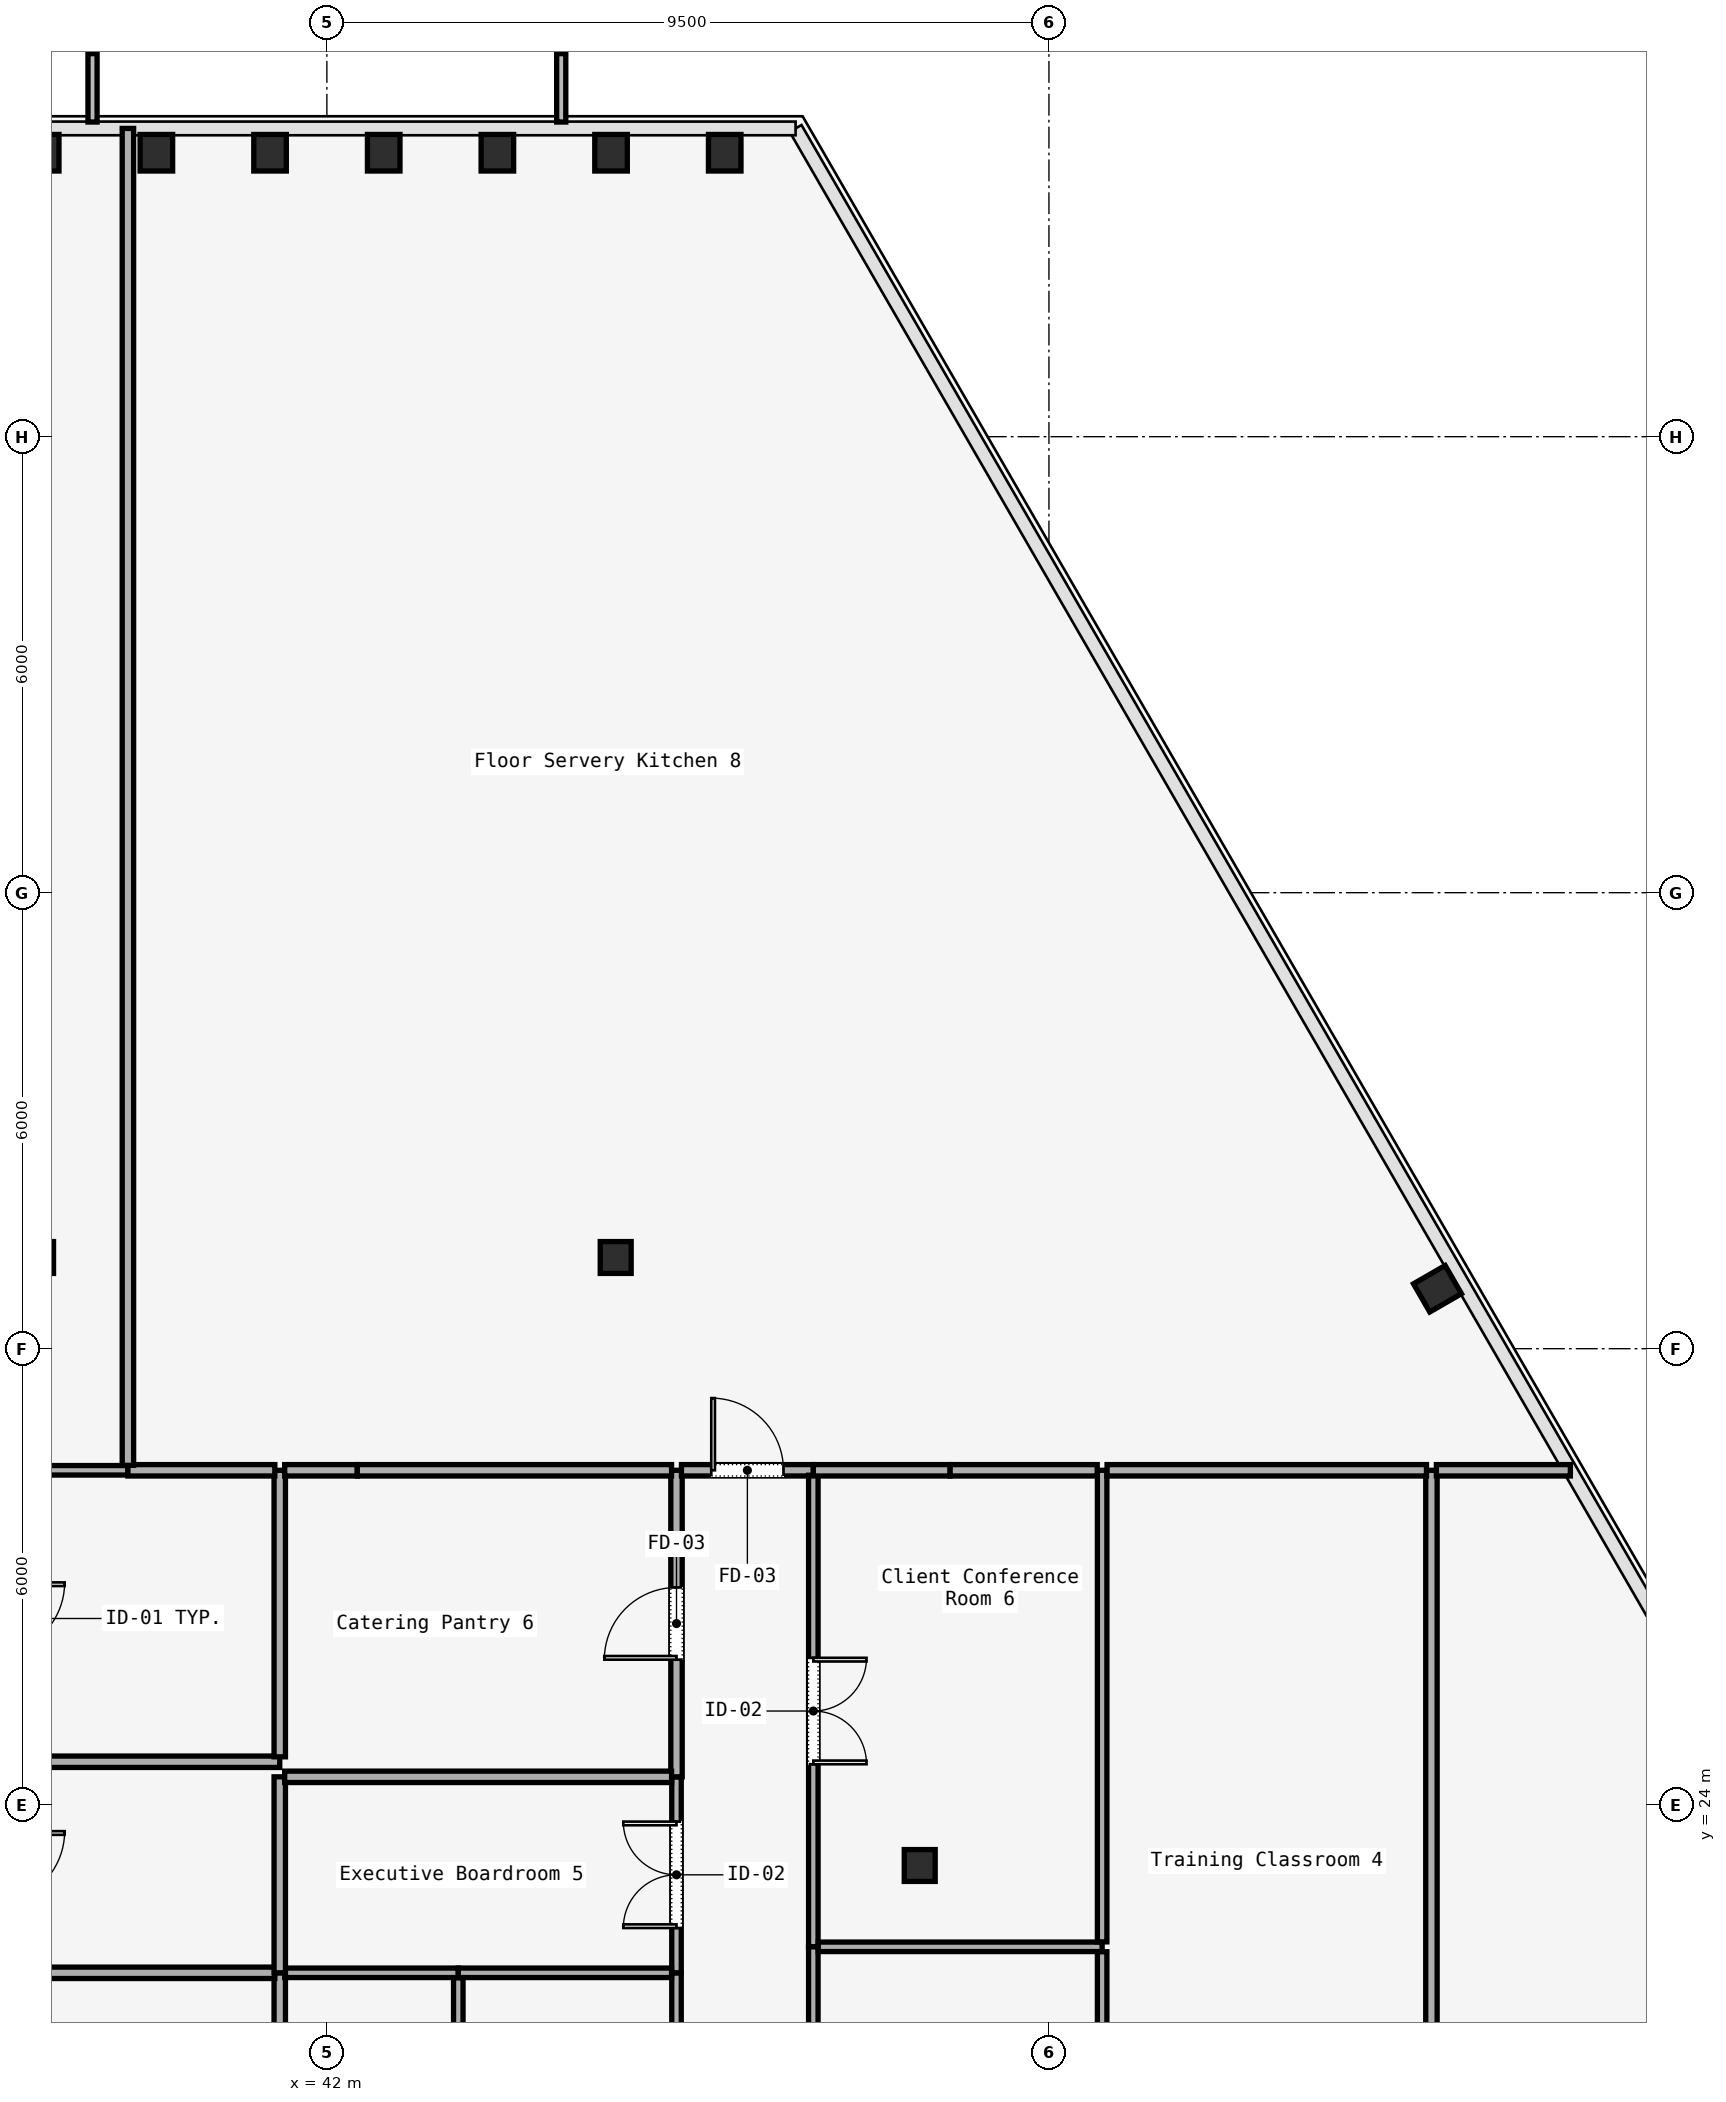
"""IFC4 building model, lengths in metres.
Left out: names, types, materials, properties, quantities, classifications, styles, units other than length and angle.
Written with IfcOpenShell. Run it as: python <this file> out.ifc"""

import sys

from ifc_helpers import new_model, si_unit, direction, frame, frame_2d, origin, origin_2d, place, context, subcontext, project, spatial, rectangle, i_section, extrude, element, fill, save


model = new_model("IFC4")
c1 = context("Model", 3, precision=1e-05, world=origin(), true_north=direction((0.0, 1.0)))
c2 = subcontext(c1, "Body", "Model", "MODEL_VIEW")
j1 = project(units=[si_unit("LENGTHUNIT", "METRE"), si_unit("PLANEANGLEUNIT", "RADIAN")], contexts=[c1])
p1 = place(None, origin())
s1 = spatial("IfcSite", under=j1, at=p1, CompositionType="ELEMENT")
p2 = place(p1, origin())
s2 = spatial("IfcBuilding", under=s1, at=p2, CompositionType="ELEMENT")
p3 = place(p2, frame((0.0, 0.0, 127.0)))
s3 = spatial("IfcBuildingStorey", under=s2, at=p3, CompositionType="ELEMENT", Elevation=127.0)
for number, where, z_axis, x_axis in (
    (1, (49.8, 23.2, 0.0), (0.0, 0.0, 1.0), (1.0, 0.0, 0.0)),
    (2, (38.2, 31.2, 0.0), (0.0, 0.0, 1.0), (1.0, 0.0, 0.0)),
    (3, (45.8, 31.2, 0.0), (0.0, 0.0, 1.0), (1.0, 0.0, 0.0)),
):
    element("IfcColumn", number, at=place(p3, frame(where, z_axis=z_axis, x_axis=x_axis)), inside=s3, PredefinedType="COLUMN", context=c2, shape_type="SweptSolid", body=[
        extrude(i_section(OverallWidth=0.407, OverallDepth=0.419, WebThickness=0.031, FlangeThickness=0.049, FilletRadius=0.015, at=origin_2d()), origin(), (0.0, 0.0, 1.0), 3.58),
    ])
for number, where, z_axis, x_axis in (
    (4, (56.612, 30.789, 0.0), (0.0, 0.0, 1.0), (-0.5, 0.866, 0.0)),
    (5, (47.234, 45.736, 0.0), (0.0, 0.0, 1.0), (1.0, 0.0, 0.0)),
    (6, (45.739, 45.736, 0.0), (0.0, 0.0, 1.0), (1.0, 0.0, 0.0)),
    (7, (44.243, 45.736, 0.0), (0.0, 0.0, 1.0), (1.0, 0.0, 0.0)),
    (8, (42.748, 45.736, 0.0), (0.0, 0.0, 1.0), (1.0, 0.0, 0.0)),
    (9, (41.252, 45.736, 0.0), (0.0, 0.0, 1.0), (1.0, 0.0, 0.0)),
    (10, (39.757, 45.736, 0.0), (0.0, 0.0, 1.0), (1.0, 0.0, 0.0)),
    (11, (38.261, 45.736, 0.0), (0.0, 0.0, 1.0), (1.0, 0.0, 0.0)),
):
    element("IfcColumn", number, at=place(p3, frame(where, z_axis=z_axis, x_axis=x_axis)), inside=s3, PredefinedType="COLUMN", context=c2, shape_type="SweptSolid", body=[
        extrude(i_section(OverallWidth=0.428, OverallDepth=0.481, WebThickness=0.051, FlangeThickness=0.065, FilletRadius=0.015, at=origin_2d()), origin(), (0.0, 0.0, 1.0), 3.58),
    ])
p4 = place(p3, frame((46.6, 17.065, 0.0), z_axis=(0.0, 0.0, 1.0), x_axis=(0.0, 1.0, 0.0)))
e12 = element("IfcWall", 12, at=p4, inside=s3, PredefinedType="PARTITIONING", context=c2, shape_type="SweptSolid", body=[
    extrude(rectangle(XDim=4.723, YDim=0.125, at=frame_2d((2.362, 0.0))), origin(), (0.0, 0.0, 1.0), 3.01),
])
p5 = place(p4, frame((1.662, 0.0, 0.0)))
e13 = element("IfcOpeningElement", 13, at=p5, cuts=e12, PredefinedType="OPENING", context=c2, shape_type="SweptSolid", body=[
    extrude(rectangle(XDim=1.4, YDim=2.2, at=frame_2d((0.7, 1.1))), frame((0.0, 0.062, 0.0), z_axis=(0.0, -1.0, 0.0), x_axis=(1.0, 0.0, 0.0)), (0.0, 0.0, 1.0), 0.125),
])
p6 = place(p3, frame((46.6, 21.788, 0.0), z_axis=(0.0, 0.0, 1.0), x_axis=(0.0, 1.0, 0.0)))
e14 = element("IfcWall", 14, at=p6, inside=s3, PredefinedType="PARTITIONING", context=c2, shape_type="SweptSolid", body=[
    extrude(rectangle(XDim=2.579, YDim=0.125, at=frame_2d((1.289, 0.0))), origin(), (0.0, 0.0, 1.0), 3.01),
])
p7 = place(p6, frame((0.589, 0.0, 0.0)))
e15 = element("IfcOpeningElement", 15, at=p7, cuts=e14, PredefinedType="OPENING", context=c2, shape_type="SweptSolid", body=[
    extrude(rectangle(XDim=1.4, YDim=2.2, at=frame_2d((0.7, 1.1))), frame((0.0, 0.062, 0.0), z_axis=(0.0, -1.0, 0.0), x_axis=(1.0, 0.0, 0.0)), (0.0, 0.0, 1.0), 0.125),
])
p8 = place(p3, frame((46.6, 24.367, 0.0), z_axis=(0.0, 0.0, 1.0), x_axis=(0.0, 1.0, 0.0)))
e16 = element("IfcWall", 16, at=p8, inside=s3, PredefinedType="PARTITIONING", context=c2, shape_type="SweptSolid", body=[
    extrude(rectangle(XDim=4.033, YDim=0.15, at=frame_2d((2.017, 0.0))), origin(), (0.0, 0.0, 1.0), 3.01),
])
p9 = place(p8, frame((1.542, 0.0, 0.0)))
e17 = element("IfcOpeningElement", 17, at=p9, cuts=e16, PredefinedType="OPENING", context=c2, shape_type="SweptSolid", body=[
    extrude(rectangle(XDim=0.95, YDim=2.2, at=frame_2d((0.475, 1.1))), frame((0.0, 0.075, 0.0), z_axis=(0.0, -1.0, 0.0), x_axis=(1.0, 0.0, 0.0)), (0.0, 0.0, 1.0), 0.15),
])
p10 = place(p3, frame((46.665, 28.4, 0.0), z_axis=(0.0, 0.0, 1.0), x_axis=(1.0, 0.0, 0.0)))
e18 = element("IfcWall", 18, at=p10, inside=s3, PredefinedType="PARTITIONING", context=c2, shape_type="SweptSolid", body=[
    extrude(rectangle(XDim=1.735, YDim=0.15, at=frame_2d((0.867, 0.0))), origin(), (0.0, 0.0, 1.0), 3.01),
])
p11 = place(p10, frame((0.393, 0.0, 0.0)))
e19 = element("IfcOpeningElement", 19, at=p11, cuts=e18, PredefinedType="OPENING", context=c2, shape_type="SweptSolid", body=[
    extrude(rectangle(XDim=0.95, YDim=2.2, at=frame_2d((0.475, 1.1))), frame((0.0, 0.075, 0.0), z_axis=(0.0, -1.0, 0.0), x_axis=(1.0, 0.0, 0.0)), (0.0, 0.0, 1.0), 0.15),
])
p12 = place(p3, frame((48.4, 28.335, 0.0), z_axis=(0.0, 0.0, 1.0), x_axis=(0.0, -1.0, 0.0)))
e20 = element("IfcWall", 20, at=p12, inside=s3, PredefinedType="PARTITIONING", context=c2, shape_type="SweptSolid", body=[
    extrude(rectangle(XDim=6.205, YDim=0.125, at=frame_2d((3.103, 0.0))), origin(), (0.0, 0.0, 1.0), 3.01),
])
p13 = place(p12, frame((2.403, 0.0, 0.0)))
e21 = element("IfcOpeningElement", 21, at=p13, cuts=e20, PredefinedType="OPENING", context=c2, shape_type="SweptSolid", body=[
    extrude(rectangle(XDim=1.4, YDim=2.2, at=frame_2d((0.7, 1.1))), frame((0.0, 0.062, 0.0), z_axis=(0.0, -1.0, 0.0), x_axis=(1.0, 0.0, 0.0)), (0.0, 0.0, 1.0), 0.125),
])
p14 = place(p3, frame((48.4, 22.13, 0.0), z_axis=(0.0, 0.0, 1.0), x_axis=(0.0, -1.0, 0.0)))
e22 = element("IfcWall", 22, at=p14, inside=s3, PredefinedType="PARTITIONING", context=c2, shape_type="SweptSolid", body=[
    extrude(rectangle(XDim=5.13, YDim=0.125, at=frame_2d((2.565, 0.0))), origin(), (0.0, 0.0, 1.0), 3.01),
])
p15 = place(p14, frame((2.09, 0.0, 0.0)))
e23 = element("IfcOpeningElement", 23, at=p15, cuts=e22, PredefinedType="OPENING", context=c2, shape_type="SweptSolid", body=[
    extrude(rectangle(XDim=0.95, YDim=2.2, at=frame_2d((0.475, 1.1))), frame((0.0, 0.062, 0.0), z_axis=(0.0, -1.0, 0.0), x_axis=(1.0, 0.0, 0.0)), (0.0, 0.0, 1.0), 0.125),
])
p16 = place(p3, frame((41.38, 21.788, 0.0), z_axis=(0.0, 0.0, 1.0), x_axis=(0.0, -1.0, 0.0)))
e24 = element("IfcWall", 24, at=p16, inside=s3, PredefinedType="PARTITIONING", context=c2, shape_type="SweptSolid", body=[
    extrude(rectangle(XDim=4.723, YDim=0.15, at=frame_2d((2.362, 0.0))), origin(), (0.0, 0.0, 1.0), 3.01),
])
p17 = place(p3, frame((37.665, 21.788, 0.0), z_axis=(0.0, 0.0, 1.0), x_axis=(1.0, 0.0, 0.0)))
e25 = element("IfcWall", 25, at=p17, inside=s3, PredefinedType="PARTITIONING", context=c2, shape_type="SweptSolid", body=[
    extrude(rectangle(XDim=3.65, YDim=0.15, at=frame_2d((1.825, 0.0))), origin(), (0.0, 0.0, 1.0), 3.01),
])
p18 = place(p3, frame((41.445, 21.788, 0.0), z_axis=(0.0, 0.0, 1.0), x_axis=(1.0, 0.0, 0.0)))
e26 = element("IfcWall", 26, at=p18, inside=s3, PredefinedType="PARTITIONING", context=c2, shape_type="SweptSolid", body=[
    extrude(rectangle(XDim=2.284, YDim=0.125, at=frame_2d((1.142, 0.0))), origin(), (0.0, 0.0, 1.0), 3.01),
])
p19 = place(p3, frame((43.729, 21.723, 0.0), z_axis=(0.0, 0.0, 1.0), x_axis=(0.0, -1.0, 0.0)))
e27 = element("IfcWall", 27, at=p19, inside=s3, PredefinedType="PARTITIONING", context=c2, shape_type="SweptSolid", body=[
    extrude(rectangle(XDim=4.658, YDim=0.125, at=frame_2d((2.329, 0.0))), origin(), (0.0, 0.0, 1.0), 3.01),
])
p20 = place(p3, frame((43.729, 21.788, 0.0), z_axis=(0.0, 0.0, 1.0), x_axis=(1.0, 0.0, 0.0)))
e28 = element("IfcWall", 28, at=p20, inside=s3, PredefinedType="PARTITIONING", context=c2, shape_type="SweptSolid", body=[
    extrude(rectangle(XDim=2.806, YDim=0.125, at=frame_2d((1.403, 0.0))), origin(), (0.0, 0.0, 1.0), 3.01),
])
p21 = place(p3, frame((48.465, 22.13, 0.0), z_axis=(0.0, 0.0, 1.0), x_axis=(1.0, 0.0, 0.0)))
e29 = element("IfcWall", 29, at=p21, inside=s3, PredefinedType="PARTITIONING", context=c2, shape_type="SweptSolid", body=[
    extrude(rectangle(XDim=3.735, YDim=0.125, at=frame_2d((1.867, 0.0))), origin(), (0.0, 0.0, 1.0), 3.01),
])
p22 = place(p3, frame((52.2, 22.065, 0.0), z_axis=(0.0, 0.0, 1.0), x_axis=(0.0, -1.0, 0.0)))
e30 = element("IfcWall", 30, at=p22, inside=s3, PredefinedType="PARTITIONING", context=c2, shape_type="SweptSolid", body=[
    extrude(rectangle(XDim=5.0, YDim=0.125, at=frame_2d((2.5, 0.0))), origin(), (0.0, 0.0, 1.0), 3.01),
])
p23 = place(p3, frame((56.532, 17.065, 0.0), z_axis=(0.0, 0.0, 1.0), x_axis=(0.0, 1.0, 0.0)))
e31 = element("IfcWall", 31, at=p23, inside=s3, PredefinedType="PARTITIONING", context=c2, shape_type="SweptSolid", body=[
    extrude(rectangle(XDim=11.335, YDim=0.15, at=frame_2d((5.667, 0.0))), origin(), (0.0, 0.0, 1.0), 3.01),
])
p24 = place(p3, frame((56.597, 28.4, 0.0), z_axis=(0.0, 0.0, 1.0), x_axis=(1.0, 0.0, 0.0)))
e32 = element("IfcWall", 32, at=p24, inside=s3, PredefinedType="PARTITIONING", context=c2, shape_type="SweptSolid", body=[
    extrude(rectangle(XDim=1.763, YDim=0.15, at=frame_2d((0.882, 0.0))), origin(), (0.0, 0.0, 1.0), 3.01),
])
p25 = place(p3, frame((52.2, 22.195, 0.0), z_axis=(0.0, 0.0, 1.0), x_axis=(0.0, 1.0, 0.0)))
e33 = element("IfcWall", 33, at=p25, inside=s3, PredefinedType="PARTITIONING", context=c2, shape_type="SweptSolid", body=[
    extrude(rectangle(XDim=6.205, YDim=0.125, at=frame_2d((3.103, 0.0))), origin(), (0.0, 0.0, 1.0), 3.01),
])
p26 = place(p3, frame((52.265, 28.4, 0.0), z_axis=(0.0, 0.0, 1.0), x_axis=(1.0, 0.0, 0.0)))
e34 = element("IfcWall", 34, at=p26, inside=s3, PredefinedType="PARTITIONING", context=c2, shape_type="SweptSolid", body=[
    extrude(rectangle(XDim=4.202, YDim=0.15, at=frame_2d((2.101, 0.0))), origin(), (0.0, 0.0, 1.0), 3.01),
])
p27 = place(p3, frame((41.38, 21.788, 0.0), z_axis=(0.0, 0.0, 1.0), x_axis=(0.0, 1.0, 0.0)))
e35 = element("IfcWall", 35, at=p27, inside=s3, PredefinedType="PARTITIONING", context=c2, shape_type="SweptSolid", body=[
    extrude(rectangle(XDim=2.579, YDim=0.15, at=frame_2d((1.289, 0.0))), origin(), (0.0, 0.0, 1.0), 3.01),
])
p28 = place(p3, frame((41.445, 24.367, 0.0), z_axis=(0.0, 0.0, 1.0), x_axis=(1.0, 0.0, 0.0)))
e36 = element("IfcWall", 36, at=p28, inside=s3, PredefinedType="PARTITIONING", context=c2, shape_type="SweptSolid", body=[
    extrude(rectangle(XDim=5.09, YDim=0.15, at=frame_2d((2.545, 0.0))), origin(), (0.0, 0.0, 1.0), 3.01),
])
p29 = place(p3, frame((37.665, 24.565, 0.0), z_axis=(0.0, 0.0, 1.0), x_axis=(1.0, 0.0, 0.0)))
e37 = element("IfcWall", 37, at=p29, inside=s3, PredefinedType="PARTITIONING", context=c2, shape_type="SweptSolid", body=[
    extrude(rectangle(XDim=3.715, YDim=0.15, at=frame_2d((1.857, 0.0))), origin(), (0.0, 0.0, 1.0), 3.01),
])
p30 = place(p3, frame((48.4, 28.4, 0.0), z_axis=(0.0, 0.0, 1.0), x_axis=(1.0, 0.0, 0.0)))
e38 = element("IfcWall", 38, at=p30, inside=s3, PredefinedType="PARTITIONING", context=c2, shape_type="SweptSolid", body=[
    extrude(rectangle(XDim=1.8, YDim=0.15, at=frame_2d((0.9, 0.0))), origin(), (0.0, 0.0, 1.0), 3.01),
])
p31 = place(p3, frame((50.2, 28.4, 0.0), z_axis=(0.0, 0.0, 1.0), x_axis=(1.0, 0.0, 0.0)))
e39 = element("IfcWall", 39, at=p31, inside=s3, PredefinedType="PARTITIONING", context=c2, shape_type="SweptSolid", body=[
    extrude(rectangle(XDim=1.935, YDim=0.15, at=frame_2d((0.968, 0.0))), origin(), (0.0, 0.0, 1.0), 3.01),
])
p32 = place(p3, frame((41.38, 24.63, 0.0), z_axis=(0.0, 0.0, 1.0), x_axis=(0.0, 1.0, 0.0)))
e40 = element("IfcWall", 40, at=p32, inside=s3, PredefinedType="PARTITIONING", context=c2, shape_type="SweptSolid", body=[
    extrude(rectangle(XDim=3.77, YDim=0.15, at=frame_2d((1.885, 0.0))), origin(), (0.0, 0.0, 1.0), 3.01),
])
p33 = place(p3, frame((41.445, 28.4, 0.0), z_axis=(0.0, 0.0, 1.0), x_axis=(1.0, 0.0, 0.0)))
e41 = element("IfcWall", 41, at=p33, inside=s3, PredefinedType="PARTITIONING", context=c2, shape_type="SweptSolid", body=[
    extrude(rectangle(XDim=0.955, YDim=0.15, at=frame_2d((0.478, 0.0))), origin(), (0.0, 0.0, 1.0), 3.01),
])
p34 = place(p3, frame((42.4, 28.4, 0.0), z_axis=(0.0, 0.0, 1.0), x_axis=(1.0, 0.0, 0.0)))
e42 = element("IfcWall", 42, at=p34, inside=s3, PredefinedType="PARTITIONING", context=c2, shape_type="SweptSolid", body=[
    extrude(rectangle(XDim=4.135, YDim=0.15, at=frame_2d((2.067, 0.0))), origin(), (0.0, 0.0, 1.0), 3.01),
])
p35 = place(p3, frame((37.6, 28.4, 0.0), z_axis=(0.0, 0.0, 1.0), x_axis=(1.0, 0.0, 0.0)))
e43 = element("IfcWall", 43, at=p35, inside=s3, PredefinedType="PARTITIONING", context=c2, shape_type="SweptSolid", body=[
    extrude(rectangle(XDim=1.782, YDim=0.125, at=frame_2d((0.891, 0.0))), origin(), (0.0, 0.0, 1.0), 3.01),
])
p36 = place(p3, frame((39.382, 28.4, 0.0), z_axis=(0.0, 0.0, 1.0), x_axis=(1.0, 0.0, 0.0)))
e44 = element("IfcWall", 44, at=p36, inside=s3, PredefinedType="PARTITIONING", context=c2, shape_type="SweptSolid", body=[
    extrude(rectangle(XDim=1.933, YDim=0.15, at=frame_2d((0.966, 0.0))), origin(), (0.0, 0.0, 1.0), 3.01),
])
p37 = place(p3, frame((39.382, 46.056, 0.0), z_axis=(0.0, 0.0, 1.0), x_axis=(0.0, -1.0, 0.0)))
e45 = element("IfcWall", 45, at=p37, inside=s3, PredefinedType="PARTITIONING", context=c2, shape_type="SweptSolid", body=[
    extrude(rectangle(XDim=17.591, YDim=0.15, at=frame_2d((8.795, 0.0))), origin(), (0.0, 0.0, 1.0), 3.01),
])
p38 = place(p7, origin())
e46 = element("IfcDoor", 46, at=p38, inside=s3, OperationType="SINGLE_SWING_RIGHT", PredefinedType="DOOR", context=c2, shape_type="SweptSolid", body=[
    extrude(rectangle(XDim=1.4, YDim=2.2, at=frame_2d((0.7, 1.1))), frame((0.0, 0.025, 0.0), z_axis=(0.0, -1.0, 0.0), x_axis=(1.0, 0.0, 0.0)), (0.0, 0.0, 1.0), 0.05),
])
fill(e15, e46)
p39 = place(p13, origin())
e47 = element("IfcDoor", 47, at=p39, inside=s3, OperationType="SINGLE_SWING_RIGHT", PredefinedType="DOOR", context=c2, shape_type="SweptSolid", body=[
    extrude(rectangle(XDim=1.4, YDim=2.2, at=frame_2d((0.7, 1.1))), frame((0.0, 0.025, 0.0), z_axis=(0.0, -1.0, 0.0), x_axis=(1.0, 0.0, 0.0)), (0.0, 0.0, 1.0), 0.05),
])
fill(e21, e47)
p40 = place(p9, origin())
e48 = element("IfcDoor", 48, at=p40, inside=s3, OperationType="SINGLE_SWING_LEFT", PredefinedType="DOOR", context=c2, shape_type="SweptSolid", body=[
    extrude(rectangle(XDim=0.95, YDim=2.2, at=frame_2d((0.475, 1.1))), frame((0.0, 0.025, 0.0), z_axis=(0.0, -1.0, 0.0), x_axis=(1.0, 0.0, 0.0)), (0.0, 0.0, 1.0), 0.05),
])
fill(e17, e48)
p41 = place(p11, origin())
e49 = element("IfcDoor", 49, at=p41, inside=s3, OperationType="SINGLE_SWING_LEFT", PredefinedType="DOOR", context=c2, shape_type="SweptSolid", body=[
    extrude(rectangle(XDim=0.95, YDim=2.2, at=frame_2d((0.475, 1.1))), frame((0.0, 0.025, 0.0), z_axis=(0.0, -1.0, 0.0), x_axis=(1.0, 0.0, 0.0)), (0.0, 0.0, 1.0), 0.05),
])
fill(e19, e49)
save(model, sys.argv[1])
